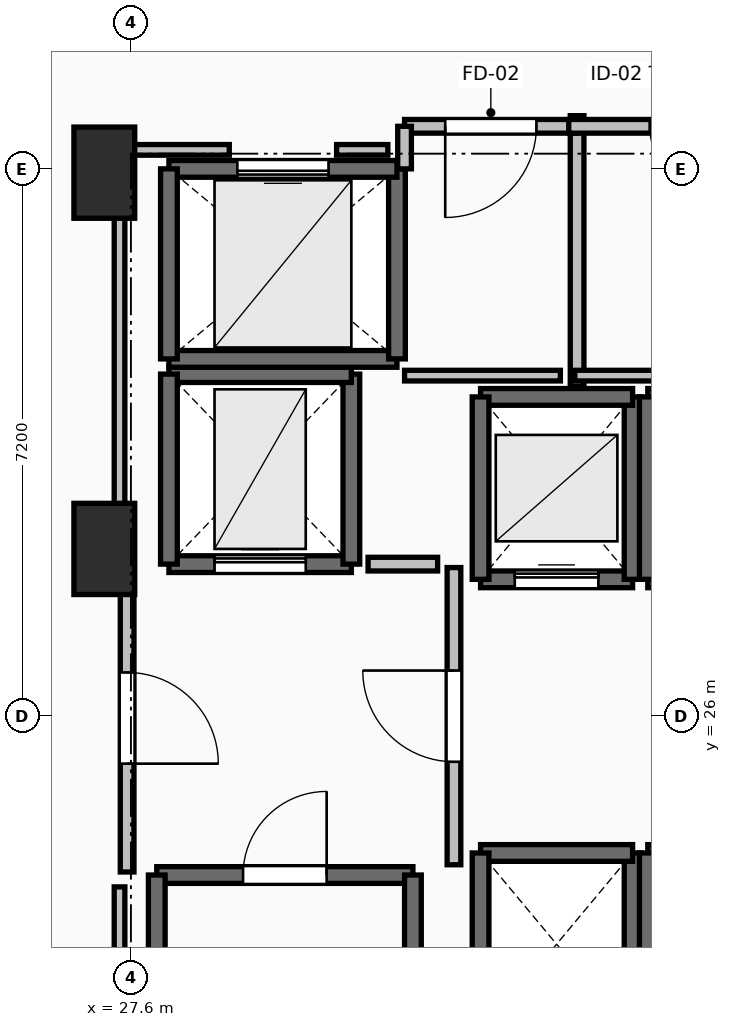
"""IFC4 building model, lengths in metres.
Left out: names, types, materials, properties, quantities, classifications, styles, units other than length and angle.
Written with IfcOpenShell. Run it as: python <this file> out.ifc"""

import sys

from ifc_helpers import new_model, si_unit, direction, frame, frame_2d, origin, origin_2d, place, context, subcontext, project, spatial, rectangle, extrude, element, fill, save


model = new_model("IFC4")
c1 = context("Model", 3, precision=1e-05, world=origin(), true_north=direction((0.0, 1.0)))
c2 = subcontext(c1, "Body", "Model", "MODEL_VIEW")
j1 = project(units=[si_unit("LENGTHUNIT", "METRE"), si_unit("PLANEANGLEUNIT", "RADIAN")], contexts=[c1])
p1 = place(None, origin())
s1 = spatial("IfcSite", under=j1, at=p1, CompositionType="ELEMENT")
p2 = place(p1, origin())
s2 = spatial("IfcBuilding", under=s1, at=p2, CompositionType="ELEMENT")
p3 = place(p2, frame((0.0, 0.0, 113.8)))
s3 = spatial("IfcBuildingStorey", under=s2, at=p3, CompositionType="ELEMENT", Elevation=113.8)
for number, where, z_axis, x_axis in (
    (1, (27.25, 28.2, 0.0), (0.0, 0.0, 1.0), (1.0, 0.0, 0.0)),
    (2, (27.25, 33.15, 0.0), (0.0, 0.0, 1.0), (1.0, 0.0, 0.0)),
):
    element("IfcColumn", number, at=place(p3, frame(where, z_axis=z_axis, x_axis=x_axis)), inside=s3, PredefinedType="PILASTER", context=c2, shape_type="SweptSolid", body=[
        extrude(rectangle(XDim=0.8, YDim=1.2, at=origin_2d()), origin(), (0.0, 0.0, 1.0), 3.5),
    ])
p4 = place(p3, frame((27.94, 23.91, 0.0), z_axis=(0.0, 0.0, 1.0), x_axis=(1.0, 0.0, 0.0)))
e3 = element("IfcWall", 3, at=p4, inside=s3, PredefinedType="SOLIDWALL", context=c2, shape_type="SweptSolid", body=[
    extrude(rectangle(XDim=3.37, YDim=0.22, at=frame_2d((1.685, 0.0))), origin(), (0.0, 0.0, 1.0), 3.24),
])
p5 = place(p4, frame((1.135, 0.0, 0.0)))
e4 = element("IfcOpeningElement", 4, at=p5, cuts=e3, PredefinedType="OPENING", context=c2, shape_type="SweptSolid", body=[
    extrude(rectangle(XDim=1.1, YDim=2.15, at=frame_2d((0.55, 1.075))), frame((0.0, 0.125, 0.0), z_axis=(0.0, -1.0, 0.0), x_axis=(1.0, 0.0, 0.0)), (0.0, 0.0, 1.0), 0.25),
])
for number, where, z_axis, x_axis in (
    (5, (31.31, 23.91, 0.0), (0.0, 0.0, 1.0), (0.0, -1.0, 0.0)),
    (6, (27.94, 16.49, 0.0), (0.0, 0.0, 1.0), (0.0, 1.0, 0.0)),
):
    element("IfcWall", number, at=place(p3, frame(where, z_axis=z_axis, x_axis=x_axis)), inside=s3, PredefinedType="SOLIDWALL", context=c2, shape_type="SweptSolid", body=[
        extrude(rectangle(XDim=7.42, YDim=0.22, at=frame_2d((3.71, 0.0))), origin(), (0.0, 0.0, 1.0), 3.24),
    ])
p6 = place(p3, frame((32.2, 27.8, 0.0), z_axis=(0.0, 0.0, 1.0), x_axis=(1.0, 0.0, 0.0)))
e7 = element("IfcWall", 7, at=p6, inside=s3, PredefinedType="SOLIDWALL", context=c2, shape_type="SweptSolid", body=[
    extrude(rectangle(XDim=2.0, YDim=0.22, at=frame_2d((1.0, 0.0))), origin(), (0.0, 0.0, 1.0), 3.24),
])
p7 = place(p6, frame((0.45, 0.0, 0.0)))
e8 = element("IfcOpeningElement", 8, at=p7, cuts=e7, PredefinedType="OPENING", context=c2, shape_type="SweptSolid", body=[
    extrude(rectangle(XDim=1.1, YDim=2.2, at=frame_2d((0.55, 1.1))), frame((0.0, 0.125, 0.0), z_axis=(0.0, -1.0, 0.0), x_axis=(1.0, 0.0, 0.0)), (0.0, 0.0, 1.0), 0.25),
])
p8 = place(p3, frame((34.2, 27.8, 0.0), z_axis=(0.0, 0.0, 1.0), x_axis=(0.0, 1.0, 0.0)))
e9 = element("IfcWall", 9, at=p8, inside=s3, PredefinedType="SOLIDWALL", context=c2, shape_type="SweptSolid", body=[
    extrude(rectangle(XDim=2.4, YDim=0.22, at=frame_2d((1.2, 0.0))), origin(), (0.0, 0.0, 1.0), 3.24),
])
p9 = place(p3, frame((34.2, 30.2, 0.0), z_axis=(0.0, 0.0, 1.0), x_axis=(-1.0, 0.0, 0.0)))
e10 = element("IfcWall", 10, at=p9, inside=s3, PredefinedType="SOLIDWALL", context=c2, shape_type="SweptSolid", body=[
    extrude(rectangle(XDim=2.0, YDim=0.22, at=frame_2d((1.0, 0.0))), origin(), (0.0, 0.0, 1.0), 3.24),
])
p10 = place(p3, frame((32.2, 30.2, 0.0), z_axis=(0.0, 0.0, 1.0), x_axis=(0.0, -1.0, 0.0)))
e11 = element("IfcWall", 11, at=p10, inside=s3, PredefinedType="SOLIDWALL", context=c2, shape_type="SweptSolid", body=[
    extrude(rectangle(XDim=2.4, YDim=0.22, at=frame_2d((1.2, 0.0))), origin(), (0.0, 0.0, 1.0), 3.24),
])
p11 = place(p3, frame((34.4, 27.8, 0.0), z_axis=(0.0, 0.0, 1.0), x_axis=(1.0, 0.0, 0.0)))
e12 = element("IfcWall", 12, at=p11, inside=s3, PredefinedType="SOLIDWALL", context=c2, shape_type="SweptSolid", body=[
    extrude(rectangle(XDim=2.0, YDim=0.22, at=frame_2d((1.0, 0.0))), origin(), (0.0, 0.0, 1.0), 3.24),
])
p12 = place(p11, frame((0.45, 0.0, 0.0)))
e13 = element("IfcOpeningElement", 13, at=p12, cuts=e12, PredefinedType="OPENING", context=c2, shape_type="SweptSolid", body=[
    extrude(rectangle(XDim=1.1, YDim=2.2, at=frame_2d((0.55, 1.1))), frame((0.0, 0.125, 0.0), z_axis=(0.0, -1.0, 0.0), x_axis=(1.0, 0.0, 0.0)), (0.0, 0.0, 1.0), 0.25),
])
p13 = place(p3, frame((36.4, 30.2, 0.0), z_axis=(0.0, 0.0, 1.0), x_axis=(-1.0, 0.0, 0.0)))
e14 = element("IfcWall", 14, at=p13, inside=s3, PredefinedType="SOLIDWALL", context=c2, shape_type="SweptSolid", body=[
    extrude(rectangle(XDim=2.0, YDim=0.22, at=frame_2d((1.0, 0.0))), origin(), (0.0, 0.0, 1.0), 3.24),
])
for number, where, z_axis, x_axis in (
    (15, (34.4, 30.2, 0.0), (0.0, 0.0, 1.0), (0.0, -1.0, 0.0)),
    (16, (34.2, 21.8, 0.0), (0.0, 0.0, 1.0), (0.0, 1.0, 0.0)),
):
    element("IfcWall", number, at=place(p3, frame(where, z_axis=z_axis, x_axis=x_axis)), inside=s3, PredefinedType="SOLIDWALL", context=c2, shape_type="SweptSolid", body=[
        extrude(rectangle(XDim=2.4, YDim=0.22, at=frame_2d((1.2, 0.0))), origin(), (0.0, 0.0, 1.0), 3.24),
    ])
p14 = place(p3, frame((34.2, 24.2, 0.0), z_axis=(0.0, 0.0, 1.0), x_axis=(-1.0, 0.0, 0.0)))
e17 = element("IfcWall", 17, at=p14, inside=s3, PredefinedType="SOLIDWALL", context=c2, shape_type="SweptSolid", body=[
    extrude(rectangle(XDim=2.0, YDim=0.22, at=frame_2d((1.0, 0.0))), origin(), (0.0, 0.0, 1.0), 3.24),
])
p15 = place(p3, frame((32.2, 24.2, 0.0), z_axis=(0.0, 0.0, 1.0), x_axis=(0.0, -1.0, 0.0)))
e18 = element("IfcWall", 18, at=p15, inside=s3, PredefinedType="SOLIDWALL", context=c2, shape_type="SweptSolid", body=[
    extrude(rectangle(XDim=2.4, YDim=0.22, at=frame_2d((1.2, 0.0))), origin(), (0.0, 0.0, 1.0), 3.24),
])
p16 = place(p3, frame((36.4, 24.2, 0.0), z_axis=(0.0, 0.0, 1.0), x_axis=(-1.0, 0.0, 0.0)))
e19 = element("IfcWall", 19, at=p16, inside=s3, PredefinedType="SOLIDWALL", context=c2, shape_type="SweptSolid", body=[
    extrude(rectangle(XDim=2.0, YDim=0.22, at=frame_2d((1.0, 0.0))), origin(), (0.0, 0.0, 1.0), 3.24),
])
p17 = place(p3, frame((34.4, 24.2, 0.0), z_axis=(0.0, 0.0, 1.0), x_axis=(0.0, -1.0, 0.0)))
e20 = element("IfcWall", 20, at=p17, inside=s3, PredefinedType="SOLIDWALL", context=c2, shape_type="SweptSolid", body=[
    extrude(rectangle(XDim=2.4, YDim=0.22, at=frame_2d((1.2, 0.0))), origin(), (0.0, 0.0, 1.0), 3.24),
])
p18 = place(p3, frame((28.1, 28.0, 0.0), z_axis=(0.0, 0.0, 1.0), x_axis=(1.0, 0.0, 0.0)))
e21 = element("IfcWall", 21, at=p18, inside=s3, PredefinedType="SHEAR", context=c2, shape_type="SweptSolid", body=[
    extrude(rectangle(XDim=2.4, YDim=0.22, at=frame_2d((1.2, 0.0))), origin(), (0.0, 0.0, 1.0), 3.24),
])
p19 = place(p18, frame((0.6, 0.0, 0.0)))
e22 = element("IfcOpeningElement", 22, at=p19, cuts=e21, PredefinedType="OPENING", context=c2, shape_type="SweptSolid", body=[
    extrude(rectangle(XDim=1.2, YDim=2.2, at=frame_2d((0.6, 1.1))), frame((0.0, 0.125, 0.0), z_axis=(0.0, -1.0, 0.0), x_axis=(1.0, 0.0, 0.0)), (0.0, 0.0, 1.0), 0.25),
])
p20 = place(p3, frame((30.5, 28.0, 0.0), z_axis=(0.0, 0.0, 1.0), x_axis=(0.0, 1.0, 0.0)))
e23 = element("IfcWall", 23, at=p20, inside=s3, PredefinedType="SHEAR", context=c2, shape_type="SweptSolid", body=[
    extrude(rectangle(XDim=2.5, YDim=0.22, at=frame_2d((1.25, 0.0))), origin(), (0.0, 0.0, 1.0), 3.24),
])
p21 = place(p3, frame((30.5, 30.5, 0.0), z_axis=(0.0, 0.0, 1.0), x_axis=(-1.0, 0.0, 0.0)))
e24 = element("IfcWall", 24, at=p21, inside=s3, PredefinedType="SHEAR", context=c2, shape_type="SweptSolid", body=[
    extrude(rectangle(XDim=2.4, YDim=0.22, at=frame_2d((1.2, 0.0))), origin(), (0.0, 0.0, 1.0), 3.24),
])
p22 = place(p3, frame((28.1, 30.5, 0.0), z_axis=(0.0, 0.0, 1.0), x_axis=(0.0, -1.0, 0.0)))
e25 = element("IfcWall", 25, at=p22, inside=s3, PredefinedType="SHEAR", context=c2, shape_type="SweptSolid", body=[
    extrude(rectangle(XDim=2.5, YDim=0.22, at=frame_2d((1.25, 0.0))), origin(), (0.0, 0.0, 1.0), 3.24),
])
p23 = place(p3, frame((28.1, 30.7, 0.0), z_axis=(0.0, 0.0, 1.0), x_axis=(1.0, 0.0, 0.0)))
e26 = element("IfcWall", 26, at=p23, inside=s3, PredefinedType="SOLIDWALL", context=c2, shape_type="SweptSolid", body=[
    extrude(rectangle(XDim=3.0, YDim=0.22, at=frame_2d((1.5, 0.0))), origin(), (0.0, 0.0, 1.0), 3.24),
])
p24 = place(p3, frame((31.1, 30.7, 0.0), z_axis=(0.0, 0.0, 1.0), x_axis=(0.0, 1.0, 0.0)))
e27 = element("IfcWall", 27, at=p24, inside=s3, PredefinedType="SOLIDWALL", context=c2, shape_type="SweptSolid", body=[
    extrude(rectangle(XDim=2.5, YDim=0.22, at=frame_2d((1.25, 0.0))), origin(), (0.0, 0.0, 1.0), 3.24),
])
p25 = place(p3, frame((31.1, 33.2, 0.0), z_axis=(0.0, 0.0, 1.0), x_axis=(-1.0, 0.0, 0.0)))
e28 = element("IfcWall", 28, at=p25, inside=s3, PredefinedType="SOLIDWALL", context=c2, shape_type="SweptSolid", body=[
    extrude(rectangle(XDim=3.0, YDim=0.22, at=frame_2d((1.5, 0.0))), origin(), (0.0, 0.0, 1.0), 3.24),
])
p26 = place(p25, frame((0.9, 0.0, 0.0)))
e29 = element("IfcOpeningElement", 29, at=p26, cuts=e28, PredefinedType="OPENING", context=c2, shape_type="SweptSolid", body=[
    extrude(rectangle(XDim=1.2, YDim=2.2, at=frame_2d((0.6, 1.1))), frame((0.0, 0.125, 0.0), z_axis=(0.0, -1.0, 0.0), x_axis=(1.0, 0.0, 0.0)), (0.0, 0.0, 1.0), 0.25),
])
p27 = place(p3, frame((28.1, 33.2, 0.0), z_axis=(0.0, 0.0, 1.0), x_axis=(0.0, -1.0, 0.0)))
e30 = element("IfcWall", 30, at=p27, inside=s3, PredefinedType="SOLIDWALL", context=c2, shape_type="SweptSolid", body=[
    extrude(rectangle(XDim=2.5, YDim=0.22, at=frame_2d((1.25, 0.0))), origin(), (0.0, 0.0, 1.0), 3.24),
])
p28 = place(p3, frame((31.85, 24.045, 0.0), z_axis=(0.0, 0.0, 1.0), x_axis=(0.0, 1.0, 0.0)))
e31 = element("IfcWall", 31, at=p28, inside=s3, PredefinedType="PARTITIONING", context=c2, shape_type="SweptSolid", body=[
    extrude(rectangle(XDim=3.91, YDim=0.18, at=frame_2d((1.955, 0.0))), origin(), (0.0, 0.0, 1.0), 3.24),
])
p29 = place(p28, frame((1.355, 0.0, 0.0)))
e32 = element("IfcOpeningElement", 32, at=p29, cuts=e31, PredefinedType="OPENING", context=c2, shape_type="SweptSolid", body=[
    extrude(rectangle(XDim=1.2, YDim=2.15, at=frame_2d((0.6, 1.075))), frame((0.0, 0.105, 0.0), z_axis=(0.0, -1.0, 0.0), x_axis=(1.0, 0.0, 0.0)), (0.0, 0.0, 1.0), 0.21),
])
p30 = place(p3, frame((27.55, 28.0, 0.0), z_axis=(0.0, 0.0, 1.0), x_axis=(0.0, -1.0, 0.0)))
e33 = element("IfcWall", 33, at=p30, inside=s3, PredefinedType="PARTITIONING", context=c2, shape_type="SweptSolid", body=[
    extrude(rectangle(XDim=4.05, YDim=0.18, at=frame_2d((2.025, 0.0))), origin(), (0.0, 0.0, 1.0), 3.24),
])
p31 = place(p30, frame((1.425, 0.0, 0.0)))
e34 = element("IfcOpeningElement", 34, at=p31, cuts=e33, PredefinedType="OPENING", context=c2, shape_type="SweptSolid", body=[
    extrude(rectangle(XDim=1.2, YDim=2.15, at=frame_2d((0.6, 1.075))), frame((0.0, 0.105, 0.0), z_axis=(0.0, -1.0, 0.0), x_axis=(1.0, 0.0, 0.0)), (0.0, 0.0, 1.0), 0.21),
])
p32 = place(p3, frame((33.47, 30.34, 0.0), z_axis=(0.0, 0.0, 1.0), x_axis=(0.0, 1.0, 0.0)))
e35 = element("IfcWall", 35, at=p32, inside=s3, PredefinedType="PARTITIONING", context=c2, shape_type="SweptSolid", body=[
    extrude(rectangle(XDim=3.56, YDim=0.18, at=frame_2d((1.78, 0.0))), origin(), (0.0, 0.0, 1.0), 3.24),
])
p33 = place(p3, frame((33.47, 33.76, 0.0), z_axis=(0.0, 0.0, 1.0), x_axis=(-1.0, 0.0, 0.0)))
e36 = element("IfcWall", 36, at=p33, inside=s3, PredefinedType="PARTITIONING", context=c2, shape_type="SweptSolid", body=[
    extrude(rectangle(XDim=2.27, YDim=0.18, at=frame_2d((1.135, 0.0))), origin(), (0.0, 0.0, 1.0), 3.24),
])
p34 = place(p33, frame((0.535, 0.0, 0.0)))
e37 = element("IfcOpeningElement", 37, at=p34, cuts=e36, PredefinedType="OPENING", context=c2, shape_type="SweptSolid", body=[
    extrude(rectangle(XDim=1.2, YDim=2.15, at=frame_2d((0.6, 1.075))), frame((0.0, 0.105, 0.0), z_axis=(0.0, -1.0, 0.0), x_axis=(1.0, 0.0, 0.0)), (0.0, 0.0, 1.0), 0.21),
])
p35 = place(p3, frame((31.2, 33.76, 0.0), z_axis=(0.0, 0.0, 1.0), x_axis=(0.0, -1.0, 0.0)))
e38 = element("IfcWall", 38, at=p35, inside=s3, PredefinedType="PARTITIONING", context=c2, shape_type="SweptSolid", body=[
    extrude(rectangle(XDim=0.56, YDim=0.18, at=frame_2d((0.28, 0.0))), origin(), (0.0, 0.0, 1.0), 3.24),
])
p36 = place(p3, frame((36.34, 33.76, 0.0), z_axis=(0.0, 0.0, 1.0), x_axis=(-1.0, 0.0, 0.0)))
e39 = element("IfcWall", 39, at=p36, inside=s3, PredefinedType="PARTITIONING", context=c2, shape_type="SweptSolid", body=[
    extrude(rectangle(XDim=2.98, YDim=0.18, at=frame_2d((1.49, 0.0))), origin(), (0.0, 0.0, 1.0), 3.24),
])
p37 = place(p36, frame((1.065, 0.0, 0.0)))
e40 = element("IfcOpeningElement", 40, at=p37, cuts=e39, PredefinedType="OPENING", context=c2, shape_type="SweptSolid", body=[
    extrude(rectangle(XDim=0.85, YDim=2.1, at=frame_2d((0.425, 1.05))), frame((0.0, 0.105, 0.0), z_axis=(0.0, -1.0, 0.0), x_axis=(1.0, 0.0, 0.0)), (0.0, 0.0, 1.0), 0.21),
])
p38 = place(p3, frame((31.635, 28.0, 0.0), z_axis=(0.0, 0.0, 1.0), x_axis=(-1.0, 0.0, 0.0)))
e41 = element("IfcWall", 41, at=p38, inside=s3, PredefinedType="PARTITIONING", context=c2, shape_type="SweptSolid", body=[
    extrude(rectangle(XDim=0.915, YDim=0.18, at=frame_2d((0.458, 0.0))), origin(), (0.0, 0.0, 1.0), 3.24),
])
p39 = place(p3, frame((31.2, 30.48, 0.0), z_axis=(0.0, 0.0, 1.0), x_axis=(1.0, 0.0, 0.0)))
e42 = element("IfcWall", 42, at=p39, inside=s3, PredefinedType="PARTITIONING", context=c2, shape_type="SweptSolid", body=[
    extrude(rectangle(XDim=2.05, YDim=0.14, at=frame_2d((1.025, 0.0))), origin(), (0.0, 0.0, 1.0), 3.24),
])
p40 = place(p3, frame((33.44, 30.48, 0.0), z_axis=(0.0, 0.0, 1.0), x_axis=(1.0, 0.0, 0.0)))
e43 = element("IfcWall", 43, at=p40, inside=s3, PredefinedType="PARTITIONING", context=c2, shape_type="SweptSolid", body=[
    extrude(rectangle(XDim=2.79, YDim=0.14, at=frame_2d((1.395, 0.0))), origin(), (0.0, 0.0, 1.0), 2.432),
])
p41 = place(p3, frame((27.45, 16.24, 0.0), z_axis=(0.0, 0.0, 1.0), x_axis=(0.0, 1.0, 0.0)))
e44 = element("IfcWall", 44, at=p41, inside=s3, PredefinedType="PARTITIONING", context=c2, shape_type="SweptSolid", body=[
    extrude(rectangle(XDim=7.514, YDim=0.14, at=frame_2d((3.757, 0.0))), origin(), (0.0, 0.0, 1.0), 2.432),
])
p42 = place(p3, frame((27.45, 28.196, 0.0), z_axis=(0.0, 0.0, 1.0), x_axis=(0.0, 1.0, 0.0)))
e45 = element("IfcWall", 45, at=p42, inside=s3, PredefinedType="PARTITIONING", context=c2, shape_type="SweptSolid", body=[
    extrude(rectangle(XDim=5.254, YDim=0.14, at=frame_2d((2.627, 0.0))), origin(), (0.0, 0.0, 1.0), 2.432),
])
p43 = place(p3, frame((27.45, 33.45, 0.0), z_axis=(0.0, 0.0, 1.0), x_axis=(1.0, 0.0, 0.0)))
e46 = element("IfcWall", 46, at=p43, inside=s3, PredefinedType="PARTITIONING", context=c2, shape_type="SweptSolid", body=[
    extrude(rectangle(XDim=1.444, YDim=0.14, at=frame_2d((0.722, 0.0))), origin(), (0.0, 0.0, 1.0), 2.432),
])
p44 = place(p3, frame((30.306, 33.45, 0.0), z_axis=(0.0, 0.0, 1.0), x_axis=(1.0, 0.0, 0.0)))
e47 = element("IfcWall", 47, at=p44, inside=s3, PredefinedType="PARTITIONING", context=c2, shape_type="SweptSolid", body=[
    extrude(rectangle(XDim=0.674, YDim=0.14, at=frame_2d((0.337, 0.0))), origin(), (0.0, 0.0, 1.0), 3.24),
])
p45 = place(p5, origin())
e48 = element("IfcDoor", 48, at=p45, inside=s3, OperationType="SINGLE_SWING_RIGHT", PredefinedType="DOOR", context=c2, shape_type="SweptSolid", body=[
    extrude(rectangle(XDim=1.1, YDim=2.15, at=frame_2d((0.55, 1.075))), frame((0.0, 0.025, 0.0), z_axis=(0.0, -1.0, 0.0), x_axis=(1.0, 0.0, 0.0)), (0.0, 0.0, 1.0), 0.05),
])
fill(e4, e48)
p46 = place(p7, origin())
e49 = element("IfcDoor", 49, at=p46, inside=s3, OperationType="SLIDING_TO_LEFT", PredefinedType="DOOR", context=c2, shape_type="SweptSolid", body=[
    extrude(rectangle(XDim=1.1, YDim=2.2, at=frame_2d((0.55, 1.1))), frame((0.0, 0.025, 0.0), z_axis=(0.0, -1.0, 0.0), x_axis=(1.0, 0.0, 0.0)), (0.0, 0.0, 1.0), 0.05),
])
fill(e8, e49)
p47 = place(p19, origin())
e50 = element("IfcDoor", 50, at=p47, inside=s3, OperationType="SLIDING_TO_LEFT", PredefinedType="DOOR", context=c2, shape_type="SweptSolid", body=[
    extrude(rectangle(XDim=1.2, YDim=2.2, at=frame_2d((0.6, 1.1))), frame((0.0, 0.025, 0.0), z_axis=(0.0, -1.0, 0.0), x_axis=(1.0, 0.0, 0.0)), (0.0, 0.0, 1.0), 0.05),
])
fill(e22, e50)
p48 = place(p26, origin())
e51 = element("IfcDoor", 51, at=p48, inside=s3, OperationType="SLIDING_TO_LEFT", PredefinedType="DOOR", context=c2, shape_type="SweptSolid", body=[
    extrude(rectangle(XDim=1.2, YDim=2.2, at=frame_2d((0.6, 1.1))), frame((0.0, 0.025, 0.0), z_axis=(0.0, -1.0, 0.0), x_axis=(1.0, 0.0, 0.0)), (0.0, 0.0, 1.0), 0.05),
])
fill(e29, e51)
p49 = place(p29, origin())
e52 = element("IfcDoor", 52, at=p49, inside=s3, OperationType="SINGLE_SWING_RIGHT", PredefinedType="DOOR", context=c2, shape_type="SweptSolid", body=[
    extrude(rectangle(XDim=1.2, YDim=2.15, at=frame_2d((0.6, 1.075))), frame((0.0, 0.025, 0.0), z_axis=(0.0, -1.0, 0.0), x_axis=(1.0, 0.0, 0.0)), (0.0, 0.0, 1.0), 0.05),
])
fill(e32, e52)
p50 = place(p31, origin())
e53 = element("IfcDoor", 53, at=p50, inside=s3, OperationType="SINGLE_SWING_RIGHT", PredefinedType="DOOR", context=c2, shape_type="SweptSolid", body=[
    extrude(rectangle(XDim=1.2, YDim=2.15, at=frame_2d((0.6, 1.075))), frame((0.0, 0.025, 0.0), z_axis=(0.0, -1.0, 0.0), x_axis=(1.0, 0.0, 0.0)), (0.0, 0.0, 1.0), 0.05),
])
fill(e34, e53)
p51 = place(p34, origin())
e54 = element("IfcDoor", 54, at=p51, inside=s3, OperationType="SINGLE_SWING_RIGHT", PredefinedType="DOOR", context=c2, shape_type="SweptSolid", body=[
    extrude(rectangle(XDim=1.2, YDim=2.15, at=frame_2d((0.6, 1.075))), frame((0.0, 0.025, 0.0), z_axis=(0.0, -1.0, 0.0), x_axis=(1.0, 0.0, 0.0)), (0.0, 0.0, 1.0), 0.05),
])
fill(e37, e54)
p52 = place(p37, origin())
e55 = element("IfcDoor", 55, at=p52, inside=s3, OperationType="SINGLE_SWING_LEFT", PredefinedType="DOOR", context=c2, shape_type="SweptSolid", body=[
    extrude(rectangle(XDim=0.85, YDim=2.1, at=frame_2d((0.425, 1.05))), frame((0.0, 0.025, 0.0), z_axis=(0.0, -1.0, 0.0), x_axis=(1.0, 0.0, 0.0)), (0.0, 0.0, 1.0), 0.05),
])
fill(e40, e55)
save(model, sys.argv[1])
